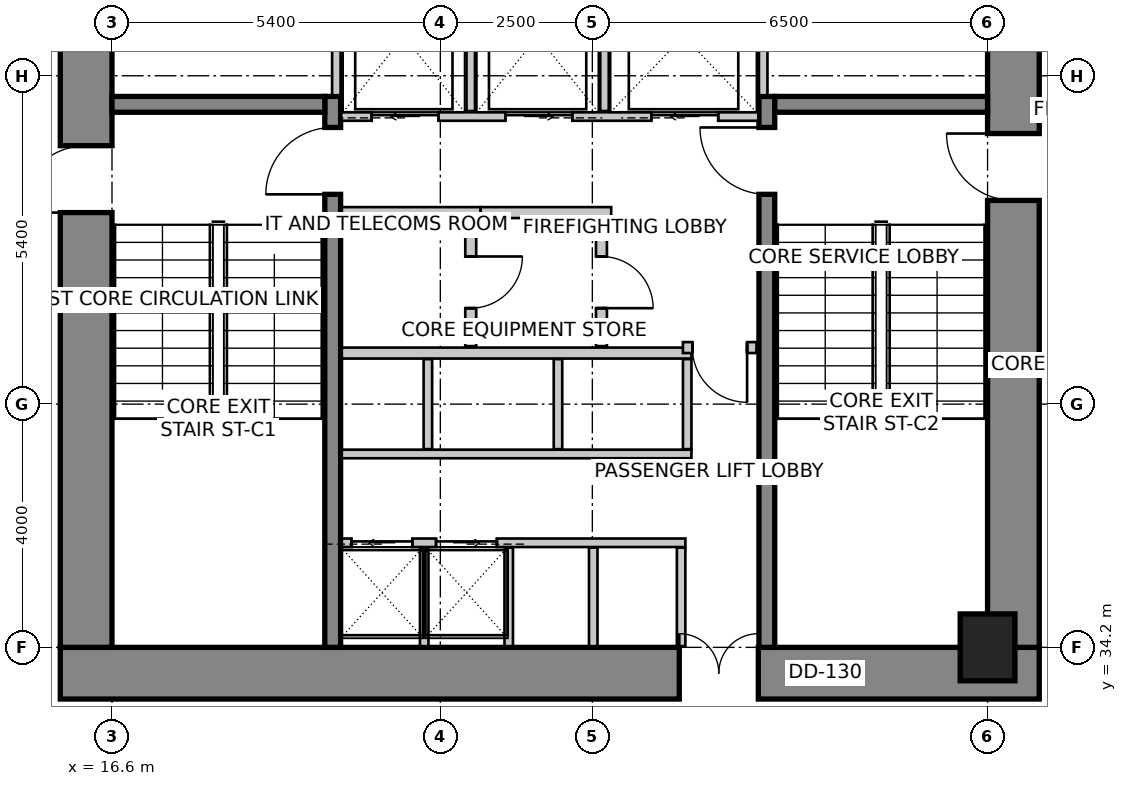
"""IFC4 building model, lengths in metres.
Left out: names, types, materials, properties, quantities, classifications, styles, units other than length and angle.
Written with IfcOpenShell. Run it as: python <this file> out.ifc"""

import sys

from ifc_helpers import new_model, si_unit, direction, frame, frame_2d, origin, origin_2d, place, context, subcontext, project, spatial, rectangle, extrude, source, transform, mapped, element, fill, save


model = new_model("IFC4")
c1 = context("Model", 3, precision=1e-05, world=origin(), true_north=direction((0.0, 1.0)))
c2 = subcontext(c1, "Body", "Model", "MODEL_VIEW")
j1 = project(units=[si_unit("LENGTHUNIT", "METRE"), si_unit("PLANEANGLEUNIT", "RADIAN")], contexts=[c1])
p1 = place(None, origin())
s1 = spatial("IfcSite", under=j1, at=p1, CompositionType="ELEMENT")
p2 = place(p1, origin())
s2 = spatial("IfcBuilding", under=s1, at=p2, CompositionType="ELEMENT")
p3 = place(p2, frame((0.0, 0.0, 95.0)))
s3 = spatial("IfcBuildingStorey", under=s2, at=p3, CompositionType="ELEMENT", Elevation=95.0)
p4 = place(p3, frame((15.75, 33.775, 0.0), z_axis=(0.0, 0.0, 1.0), x_axis=(1.0, 0.0, 0.0)))
e1 = element("IfcWall", 1, at=p4, inside=s3, PredefinedType="SHEAR", context=c2, shape_type="SweptSolid", body=[
    extrude(rectangle(XDim=16.1, YDim=0.85, at=frame_2d((8.05, 0.0))), origin(), (0.0, 0.0, 1.0), 4.0),
])
m1 = source(origin(), c2, "Body", "SweptSolid", [
    extrude(rectangle(XDim=1.3, YDim=2.15, at=frame_2d((0.65, 1.075))), frame((0.0, 0.435, 0.0), z_axis=(0.0, -1.0, 0.0), x_axis=(1.0, 0.0, 0.0)), (0.0, 0.0, 1.0), 0.87),
])
p5 = place(p4, frame((10.18, 0.0, 0.0)))
e2 = element("IfcOpeningElement", 2, at=p5, cuts=e1, PredefinedType="OPENING", context=c2, shape_type="MappedRepresentation", body=[
    mapped(m1, transform((0.0, 0.0, 0.0), scale=1.0)),
])
p6 = place(p3, frame((16.175, 34.2, 0.0), z_axis=(0.0, 0.0, 1.0), x_axis=(0.0, 1.0, 0.0)))
e3 = element("IfcWall", 3, at=p6, inside=s3, PredefinedType="SHEAR", context=c2, shape_type="SweptSolid", body=[
    extrude(rectangle(XDim=11.4, YDim=0.85, at=frame_2d((5.7, 0.0))), origin(), (0.0, 0.0, 1.0), 4.0),
])
m2 = source(origin(), c2, "Body", "SweptSolid", [
    extrude(rectangle(XDim=1.1, YDim=2.15, at=frame_2d((0.55, 1.075))), frame((0.0, 0.435, 0.0), z_axis=(0.0, -1.0, 0.0), x_axis=(1.0, 0.0, 0.0)), (0.0, 0.0, 1.0), 0.87),
])
p7 = place(p6, frame((7.15, 0.0, 0.0)))
e4 = element("IfcOpeningElement", 4, at=p7, cuts=e3, PredefinedType="OPENING", context=c2, shape_type="MappedRepresentation", body=[
    mapped(m2, transform((0.0, 0.0, 0.0), scale=1.0)),
])
p8 = place(p3, frame((31.425, 34.2, 0.0), z_axis=(0.0, 0.0, 1.0), x_axis=(0.0, 1.0, 0.0)))
e5 = element("IfcWall", 5, at=p8, inside=s3, PredefinedType="SHEAR", context=c2, shape_type="SweptSolid", body=[
    extrude(rectangle(XDim=11.4, YDim=0.85, at=frame_2d((5.7, 0.0))), origin(), (0.0, 0.0, 1.0), 4.0),
])
p9 = place(p8, frame((7.35, 0.0, 0.0)))
e6 = element("IfcOpeningElement", 6, at=p9, cuts=e5, PredefinedType="OPENING", context=c2, shape_type="MappedRepresentation", body=[
    mapped(m2, transform((0.0, 0.0, 0.0), scale=1.0)),
])
p10 = place(p3, frame((20.23, 34.2, 0.0), z_axis=(0.0, 0.0, 1.0), x_axis=(0.0, 1.0, 0.0)))
e7 = element("IfcWall", 7, at=p10, inside=s3, PredefinedType="SHEAR", context=c2, shape_type="SweptSolid", body=[
    extrude(rectangle(XDim=9.06, YDim=0.26, at=frame_2d((4.53, 0.0))), origin(), (0.0, 0.0, 1.0), 4.0),
])
m3 = source(origin(), c2, "Body", "SweptSolid", [
    extrude(rectangle(XDim=1.1, YDim=2.15, at=frame_2d((0.55, 1.075))), frame((0.0, 0.14, 0.0), z_axis=(0.0, -1.0, 0.0), x_axis=(1.0, 0.0, 0.0)), (0.0, 0.0, 1.0), 0.28),
])
p11 = place(p10, frame((7.45, 0.0, 0.0)))
e8 = element("IfcOpeningElement", 8, at=p11, cuts=e7, PredefinedType="OPENING", context=c2, shape_type="MappedRepresentation", body=[
    mapped(m3, transform((0.0, 0.0, 0.0), scale=1.0)),
])
p12 = place(p3, frame((27.37, 34.2, 0.0), z_axis=(0.0, 0.0, 1.0), x_axis=(0.0, 1.0, 0.0)))
e9 = element("IfcWall", 9, at=p12, inside=s3, PredefinedType="SHEAR", context=c2, shape_type="SweptSolid", body=[
    extrude(rectangle(XDim=9.06, YDim=0.26, at=frame_2d((4.53, 0.0))), origin(), (0.0, 0.0, 1.0), 4.0),
])
p13 = place(p12, frame((7.45, 0.0, 0.0)))
e10 = element("IfcOpeningElement", 10, at=p13, cuts=e9, PredefinedType="OPENING", context=c2, shape_type="MappedRepresentation", body=[
    mapped(m3, transform((0.0, 0.0, 0.0), scale=1.0)),
])
for number, where, z_axis, x_axis in (
    (11, (16.6, 43.13, 0.0), (0.0, 0.0, 1.0), (1.0, 0.0, 0.0)),
    (12, (27.5, 43.13, 0.0), (0.0, 0.0, 1.0), (1.0, 0.0, 0.0)),
):
    element("IfcWall", number, at=place(p3, frame(where, z_axis=z_axis, x_axis=x_axis)), inside=s3, PredefinedType="SHEAR", context=c2, shape_type="SweptSolid", body=[
        extrude(rectangle(XDim=3.5, YDim=0.26, at=frame_2d((1.75, 0.0))), origin(), (0.0, 0.0, 1.0), 4.0),
    ])
m4 = source(origin(), c2, "Body", "SweptSolid", [
    extrude(rectangle(XDim=0.9, YDim=1.1, at=origin_2d()), origin(), (0.0, 0.0, 1.0), 4.0),
])
p14 = place(p3, frame((31.0, 34.2, 0.0), z_axis=(0.0, 0.0, 1.0), x_axis=(1.0, 0.0, 0.0)))
e13 = element("IfcColumn", 13, at=p14, inside=s3, PredefinedType="COLUMN", context=c2, shape_type="MappedRepresentation", body=[
    mapped(m4, transform((0.0, 0.0, 0.0), scale=1.0)),
])
p15 = place(p3, frame((20.37, 42.93, 0.0), z_axis=(0.0, 0.0, 1.0), x_axis=(1.0, 0.0, 0.0)))
e14 = element("IfcWall", 14, at=p15, inside=s3, PredefinedType="SOLIDWALL", context=c2, shape_type="SweptSolid", body=[
    extrude(rectangle(XDim=6.86, YDim=0.14, at=frame_2d((3.43, 0.0))), origin(), (0.0, 0.0, 1.0), 3.7),
])
m5 = source(origin(), c2, "Body", "SweptSolid", [
    extrude(rectangle(XDim=1.1, YDim=2.15, at=frame_2d((0.55, 1.075))), frame((0.0, 0.08, 0.0), z_axis=(0.0, -1.0, 0.0), x_axis=(1.0, 0.0, 0.0)), (0.0, 0.0, 1.0), 0.16),
])
p16 = place(p15, frame((0.5, 0.0, 0.0)))
e15 = element("IfcOpeningElement", 15, at=p16, cuts=e14, PredefinedType="OPENING", context=c2, shape_type="MappedRepresentation", body=[
    mapped(m5, transform((0.0, 0.0, 0.0), scale=1.0)),
])
p17 = place(p15, frame((2.7, 0.0, 0.0)))
e16 = element("IfcOpeningElement", 16, at=p17, cuts=e14, PredefinedType="OPENING", context=c2, shape_type="MappedRepresentation", body=[
    mapped(m5, transform((0.0, 0.0, 0.0), scale=1.0)),
])
p18 = place(p15, frame((5.1, 0.0, 0.0)))
e17 = element("IfcOpeningElement", 17, at=p18, cuts=e14, PredefinedType="OPENING", context=c2, shape_type="MappedRepresentation", body=[
    mapped(m5, transform((0.0, 0.0, 0.0), scale=1.0)),
])
for number, where, z_axis, x_axis in (
    (18, (20.29, 43.28, 0.0), (0.0, 0.0, 1.0), (0.0, 1.0, 0.0)),
    (19, (27.31, 43.28, 0.0), (0.0, 0.0, 1.0), (0.0, 1.0, 0.0)),
):
    element("IfcWall", number, at=place(p3, frame(where, z_axis=z_axis, x_axis=x_axis)), inside=s3, PredefinedType="SOLIDWALL", context=c2, shape_type="SweptSolid", body=[
        extrude(rectangle(XDim=2.3, YDim=0.14, at=frame_2d((1.15, 0.0))), origin(), (0.0, 0.0, 1.0), 3.7),
    ])
for number, where, z_axis, x_axis in (
    (20, (22.5, 43.02, 0.0), (0.0, 0.0, 1.0), (0.0, 1.0, 0.0)),
    (21, (24.7, 43.02, 0.0), (0.0, 0.0, 1.0), (0.0, 1.0, 0.0)),
):
    element("IfcWall", number, at=place(p3, frame(where, z_axis=z_axis, x_axis=x_axis)), inside=s3, PredefinedType="SOLIDWALL", context=c2, shape_type="SweptSolid", body=[
        extrude(rectangle(XDim=2.56, YDim=0.14, at=frame_2d((1.28, 0.0))), origin(), (0.0, 0.0, 1.0), 3.7),
    ])
p19 = place(p3, frame((20.38, 35.92, 0.0), z_axis=(0.0, 0.0, 1.0), x_axis=(1.0, 0.0, 0.0)))
e22 = element("IfcWall", 22, at=p19, inside=s3, PredefinedType="SOLIDWALL", context=c2, shape_type="SweptSolid", body=[
    extrude(rectangle(XDim=5.65, YDim=0.14, at=frame_2d((2.825, 0.0))), origin(), (0.0, 0.0, 1.0), 3.7),
])
m6 = source(origin(), c2, "Body", "SweptSolid", [
    extrude(rectangle(XDim=1.0, YDim=2.15, at=frame_2d((0.5, 1.075))), frame((0.0, 0.08, 0.0), z_axis=(0.0, -1.0, 0.0), x_axis=(1.0, 0.0, 0.0)), (0.0, 0.0, 1.0), 0.16),
])
p20 = place(p19, frame((0.16, 0.0, 0.0)))
e23 = element("IfcOpeningElement", 23, at=p20, cuts=e22, PredefinedType="OPENING", context=c2, shape_type="MappedRepresentation", body=[
    mapped(m6, transform((0.0, 0.0, 0.0), scale=1.0)),
])
p21 = place(p19, frame((1.55, 0.0, 0.0)))
e24 = element("IfcOpeningElement", 24, at=p21, cuts=e22, PredefinedType="OPENING", context=c2, shape_type="MappedRepresentation", body=[
    mapped(m6, transform((0.0, 0.0, 0.0), scale=1.0)),
])
for number, where, z_axis, x_axis in (
    (25, (25.96, 34.22, 0.0), (0.0, 0.0, 1.0), (0.0, 1.0, 0.0)),
    (26, (21.735, 34.22, 0.0), (0.0, 0.0, 1.0), (0.0, 1.0, 0.0)),
    (27, (23.125, 34.22, 0.0), (0.0, 0.0, 1.0), (0.0, 1.0, 0.0)),
    (28, (24.515, 34.22, 0.0), (0.0, 0.0, 1.0), (0.0, 1.0, 0.0)),
):
    element("IfcWall", number, at=place(p3, frame(where, z_axis=z_axis, x_axis=x_axis)), inside=s3, PredefinedType="SOLIDWALL", context=c2, shape_type="SweptSolid", body=[
        extrude(rectangle(XDim=1.62, YDim=0.14, at=frame_2d((0.81, 0.0))), origin(), (0.0, 0.0, 1.0), 2.992),
    ])
p22 = place(p3, frame((20.38, 37.38, 0.0), z_axis=(0.0, 0.0, 1.0), x_axis=(1.0, 0.0, 0.0)))
e29 = element("IfcWall", 29, at=p22, inside=s3, PredefinedType="SOLIDWALL", context=c2, shape_type="SweptSolid", body=[
    extrude(rectangle(XDim=5.75, YDim=0.14, at=frame_2d((2.875, 0.0))), origin(), (0.0, 0.0, 1.0), 3.7),
])
p23 = place(p3, frame((20.38, 39.04, 0.0), z_axis=(0.0, 0.0, 1.0), x_axis=(1.0, 0.0, 0.0)))
e30 = element("IfcWall", 30, at=p23, inside=s3, PredefinedType="SOLIDWALL", context=c2, shape_type="SweptSolid", body=[
    extrude(rectangle(XDim=5.75, YDim=0.18, at=frame_2d((2.875, 0.0))), origin(), (0.0, 0.0, 1.0), 3.7),
])
for number, where, z_axis, x_axis in (
    (31, (26.06, 37.46, 0.0), (0.0, 0.0, 1.0), (0.0, 1.0, 0.0)),
    (32, (21.795, 37.46, 0.0), (0.0, 0.0, 1.0), (0.0, 1.0, 0.0)),
    (33, (23.935, 37.46, 0.0), (0.0, 0.0, 1.0), (0.0, 1.0, 0.0)),
):
    element("IfcWall", number, at=place(p3, frame(where, z_axis=z_axis, x_axis=x_axis)), inside=s3, PredefinedType="SOLIDWALL", context=c2, shape_type="SweptSolid", body=[
        extrude(rectangle(XDim=1.48, YDim=0.14, at=frame_2d((0.74, 0.0))), origin(), (0.0, 0.0, 1.0), 3.7),
    ])
p24 = place(p3, frame((22.66, 41.35, 0.0), z_axis=(0.0, 0.0, 1.0), x_axis=(-1.0, 0.0, 0.0)))
e34 = element("IfcWall", 34, at=p24, inside=s3, PredefinedType="PARTITIONING", context=c2, shape_type="SweptSolid", body=[
    extrude(rectangle(XDim=2.28, YDim=0.18, at=frame_2d((1.14, 0.0))), origin(), (0.0, 0.0, 1.0), 3.7),
])
p25 = place(p3, frame((24.81, 41.35, 0.0), z_axis=(0.0, 0.0, 1.0), x_axis=(-1.0, 0.0, 0.0)))
e35 = element("IfcWall", 35, at=p25, inside=s3, PredefinedType="PARTITIONING", context=c2, shape_type="SweptSolid", body=[
    extrude(rectangle(XDim=2.148, YDim=0.18, at=frame_2d((1.074, 0.0))), origin(), (0.0, 0.0, 1.0), 3.7),
])
p26 = place(p3, frame((22.5, 41.256, 0.0), z_axis=(0.0, 0.0, 1.0), x_axis=(0.0, -1.0, 0.0)))
e36 = element("IfcWall", 36, at=p26, inside=s3, PredefinedType="PARTITIONING", context=c2, shape_type="SweptSolid", body=[
    extrude(rectangle(XDim=2.106, YDim=0.18, at=frame_2d((1.053, 0.0))), origin(), (0.0, 0.0, 1.0), 3.7),
])
m7 = source(origin(), c2, "Body", "SweptSolid", [
    extrude(rectangle(XDim=0.85, YDim=2.15, at=frame_2d((0.425, 1.075))), frame((0.0, 0.1, 0.0), z_axis=(0.0, -1.0, 0.0), x_axis=(1.0, 0.0, 0.0)), (0.0, 0.0, 1.0), 0.2),
])
p27 = place(p26, frame((0.628, 0.0, 0.0)))
e37 = element("IfcOpeningElement", 37, at=p27, cuts=e36, PredefinedType="OPENING", context=c2, shape_type="MappedRepresentation", body=[
    mapped(m7, transform((0.0, 0.0, 0.0), scale=1.0)),
])
p28 = place(p3, frame((24.65, 41.256, 0.0), z_axis=(0.0, 0.0, 1.0), x_axis=(0.0, -1.0, 0.0)))
e38 = element("IfcWall", 38, at=p28, inside=s3, PredefinedType="PARTITIONING", context=c2, shape_type="SweptSolid", body=[
    extrude(rectangle(XDim=2.106, YDim=0.18, at=frame_2d((1.053, 0.0))), origin(), (0.0, 0.0, 1.0), 3.7),
])
p29 = place(p28, frame((0.628, 0.0, 0.0)))
e39 = element("IfcOpeningElement", 39, at=p29, cuts=e38, PredefinedType="OPENING", context=c2, shape_type="MappedRepresentation", body=[
    mapped(m7, transform((0.0, 0.0, 0.0), scale=1.0)),
])
p30 = place(p3, frame((27.2, 39.13, 0.0), z_axis=(0.0, 0.0, 1.0), x_axis=(-1.0, 0.0, 0.0)))
e40 = element("IfcWall", 40, at=p30, inside=s3, PredefinedType="PARTITIONING", context=c2, shape_type="SweptSolid", body=[
    extrude(rectangle(XDim=1.21, YDim=0.18, at=frame_2d((0.605, 0.0))), origin(), (0.0, 0.0, 1.0), 3.7),
])
m8 = source(origin(), c2, "Body", "SweptSolid", [
    extrude(rectangle(XDim=0.9, YDim=2.15, at=frame_2d((0.45, 1.075))), frame((0.0, 0.1, 0.0), z_axis=(0.0, -1.0, 0.0), x_axis=(1.0, 0.0, 0.0)), (0.0, 0.0, 1.0), 0.2),
])
p31 = place(p30, frame((0.155, 0.0, 0.0)))
e41 = element("IfcOpeningElement", 41, at=p31, cuts=e40, PredefinedType="OPENING", context=c2, shape_type="MappedRepresentation", body=[
    mapped(m8, transform((0.0, 0.0, 0.0), scale=1.0)),
])
m9 = source(origin(), c2, "Body", "SweptSolid", [
    extrude(rectangle(XDim=1.1, YDim=2.15, at=frame_2d((0.55, 1.075))), frame((0.0, 0.025, 0.0), z_axis=(0.0, -1.0, 0.0), x_axis=(1.0, 0.0, 0.0)), (0.0, 0.0, 1.0), 0.05),
])
p32 = place(p16, origin())
e42 = element("IfcDoor", 42, at=p32, inside=s3, OperationType="SLIDING_TO_LEFT", PredefinedType="DOOR", context=c2, shape_type="MappedRepresentation", body=[
    mapped(m9, transform((0.0, 0.0, 0.0), scale=1.0)),
])
fill(e15, e42)
p33 = place(p17, origin())
e43 = element("IfcDoor", 43, at=p33, inside=s3, OperationType="SLIDING_TO_RIGHT", PredefinedType="DOOR", context=c2, shape_type="MappedRepresentation", body=[
    mapped(m9, transform((0.0, 0.0, 0.0), scale=1.0)),
])
fill(e16, e43)
m10 = source(origin(), c2, "Body", "SweptSolid", [
    extrude(rectangle(XDim=1.1, YDim=2.15, at=frame_2d((0.55, 1.075))), frame((0.0, 0.025, 0.0), z_axis=(0.0, -1.0, 0.0), x_axis=(1.0, 0.0, 0.0)), (0.0, 0.0, 1.0), 0.05),
])
p34 = place(p18, origin())
e44 = element("IfcDoor", 44, at=p34, inside=s3, OperationType="SLIDING_TO_LEFT", PredefinedType="DOOR", context=c2, shape_type="MappedRepresentation", body=[
    mapped(m10, transform((0.0, 0.0, 0.0), scale=1.0)),
])
fill(e17, e44)
m11 = source(origin(), c2, "Body", "SweptSolid", [
    extrude(rectangle(XDim=1.0, YDim=2.15, at=frame_2d((0.5, 1.075))), frame((0.0, 0.025, 0.0), z_axis=(0.0, -1.0, 0.0), x_axis=(1.0, 0.0, 0.0)), (0.0, 0.0, 1.0), 0.05),
])
p35 = place(p20, origin())
e45 = element("IfcDoor", 45, at=p35, inside=s3, OperationType="SLIDING_TO_LEFT", PredefinedType="DOOR", context=c2, shape_type="MappedRepresentation", body=[
    mapped(m11, transform((0.0, 0.0, 0.0), scale=1.0)),
])
fill(e23, e45)
p36 = place(p21, origin())
e46 = element("IfcDoor", 46, at=p36, inside=s3, OperationType="SLIDING_TO_RIGHT", PredefinedType="DOOR", context=c2, shape_type="MappedRepresentation", body=[
    mapped(m11, transform((0.0, 0.0, 0.0), scale=1.0)),
])
fill(e24, e46)
m12 = source(origin(), c2, "Body", "SweptSolid", [
    extrude(rectangle(XDim=1.1, YDim=2.15, at=frame_2d((0.55, 1.075))), frame((0.0, 0.025, 0.0), z_axis=(0.0, -1.0, 0.0), x_axis=(1.0, 0.0, 0.0)), (0.0, 0.0, 1.0), 0.05),
])
p37 = place(p11, origin())
e47 = element("IfcDoor", 47, at=p37, inside=s3, OperationType="SINGLE_SWING_LEFT", PredefinedType="DOOR", context=c2, shape_type="MappedRepresentation", body=[
    mapped(m12, transform((0.0, 0.0, 0.0), scale=1.0)),
])
fill(e8, e47)
p38 = place(p13, origin())
e48 = element("IfcDoor", 48, at=p38, inside=s3, OperationType="SINGLE_SWING_RIGHT", PredefinedType="DOOR", context=c2, shape_type="MappedRepresentation", body=[
    mapped(m12, transform((0.0, 0.0, 0.0), scale=1.0)),
])
fill(e10, e48)
p39 = place(p7, origin())
e49 = element("IfcDoor", 49, at=p39, inside=s3, OperationType="SINGLE_SWING_LEFT", PredefinedType="DOOR", context=c2, shape_type="MappedRepresentation", body=[
    mapped(m12, transform((0.0, 0.0, 0.0), scale=1.0)),
])
fill(e4, e49)
p40 = place(p9, origin())
e50 = element("IfcDoor", 50, at=p40, inside=s3, OperationType="SINGLE_SWING_RIGHT", PredefinedType="DOOR", context=c2, shape_type="MappedRepresentation", body=[
    mapped(m12, transform((0.0, 0.0, 0.0), scale=1.0)),
])
fill(e6, e50)
m13 = source(origin(), c2, "Body", "SweptSolid", [
    extrude(rectangle(XDim=1.3, YDim=2.15, at=frame_2d((0.65, 1.075))), frame((0.0, 0.025, 0.0), z_axis=(0.0, -1.0, 0.0), x_axis=(1.0, 0.0, 0.0)), (0.0, 0.0, 1.0), 0.05),
])
p41 = place(p5, origin())
e51 = element("IfcDoor", 51, at=p41, inside=s3, OperationType="DOUBLE_DOOR_SINGLE_SWING", PredefinedType="DOOR", context=c2, shape_type="MappedRepresentation", body=[
    mapped(m13, transform((0.0, 0.0, 0.0), scale=1.0)),
])
fill(e2, e51)
m14 = source(origin(), c2, "Body", "SweptSolid", [
    extrude(rectangle(XDim=0.85, YDim=2.15, at=frame_2d((0.425, 1.075))), frame((0.0, 0.025, 0.0), z_axis=(0.0, -1.0, 0.0), x_axis=(1.0, 0.0, 0.0)), (0.0, 0.0, 1.0), 0.05),
])
p42 = place(p27, origin())
e52 = element("IfcDoor", 52, at=p42, inside=s3, OperationType="SINGLE_SWING_LEFT", PredefinedType="DOOR", context=c2, shape_type="MappedRepresentation", body=[
    mapped(m14, transform((0.0, 0.0, 0.0), scale=1.0)),
])
fill(e37, e52)
p43 = place(p29, origin())
e53 = element("IfcDoor", 53, at=p43, inside=s3, OperationType="SINGLE_SWING_RIGHT", PredefinedType="DOOR", context=c2, shape_type="MappedRepresentation", body=[
    mapped(m14, transform((0.0, 0.0, 0.0), scale=1.0)),
])
fill(e39, e53)
m15 = source(origin(), c2, "Body", "SweptSolid", [
    extrude(rectangle(XDim=0.9, YDim=2.15, at=frame_2d((0.45, 1.075))), frame((0.0, 0.025, 0.0), z_axis=(0.0, -1.0, 0.0), x_axis=(1.0, 0.0, 0.0)), (0.0, 0.0, 1.0), 0.05),
])
p44 = place(p31, origin())
e54 = element("IfcDoor", 54, at=p44, inside=s3, OperationType="SINGLE_SWING_LEFT", PredefinedType="DOOR", context=c2, shape_type="MappedRepresentation", body=[
    mapped(m15, transform((0.0, 0.0, 0.0), scale=1.0)),
])
fill(e41, e54)
save(model, sys.argv[1])
